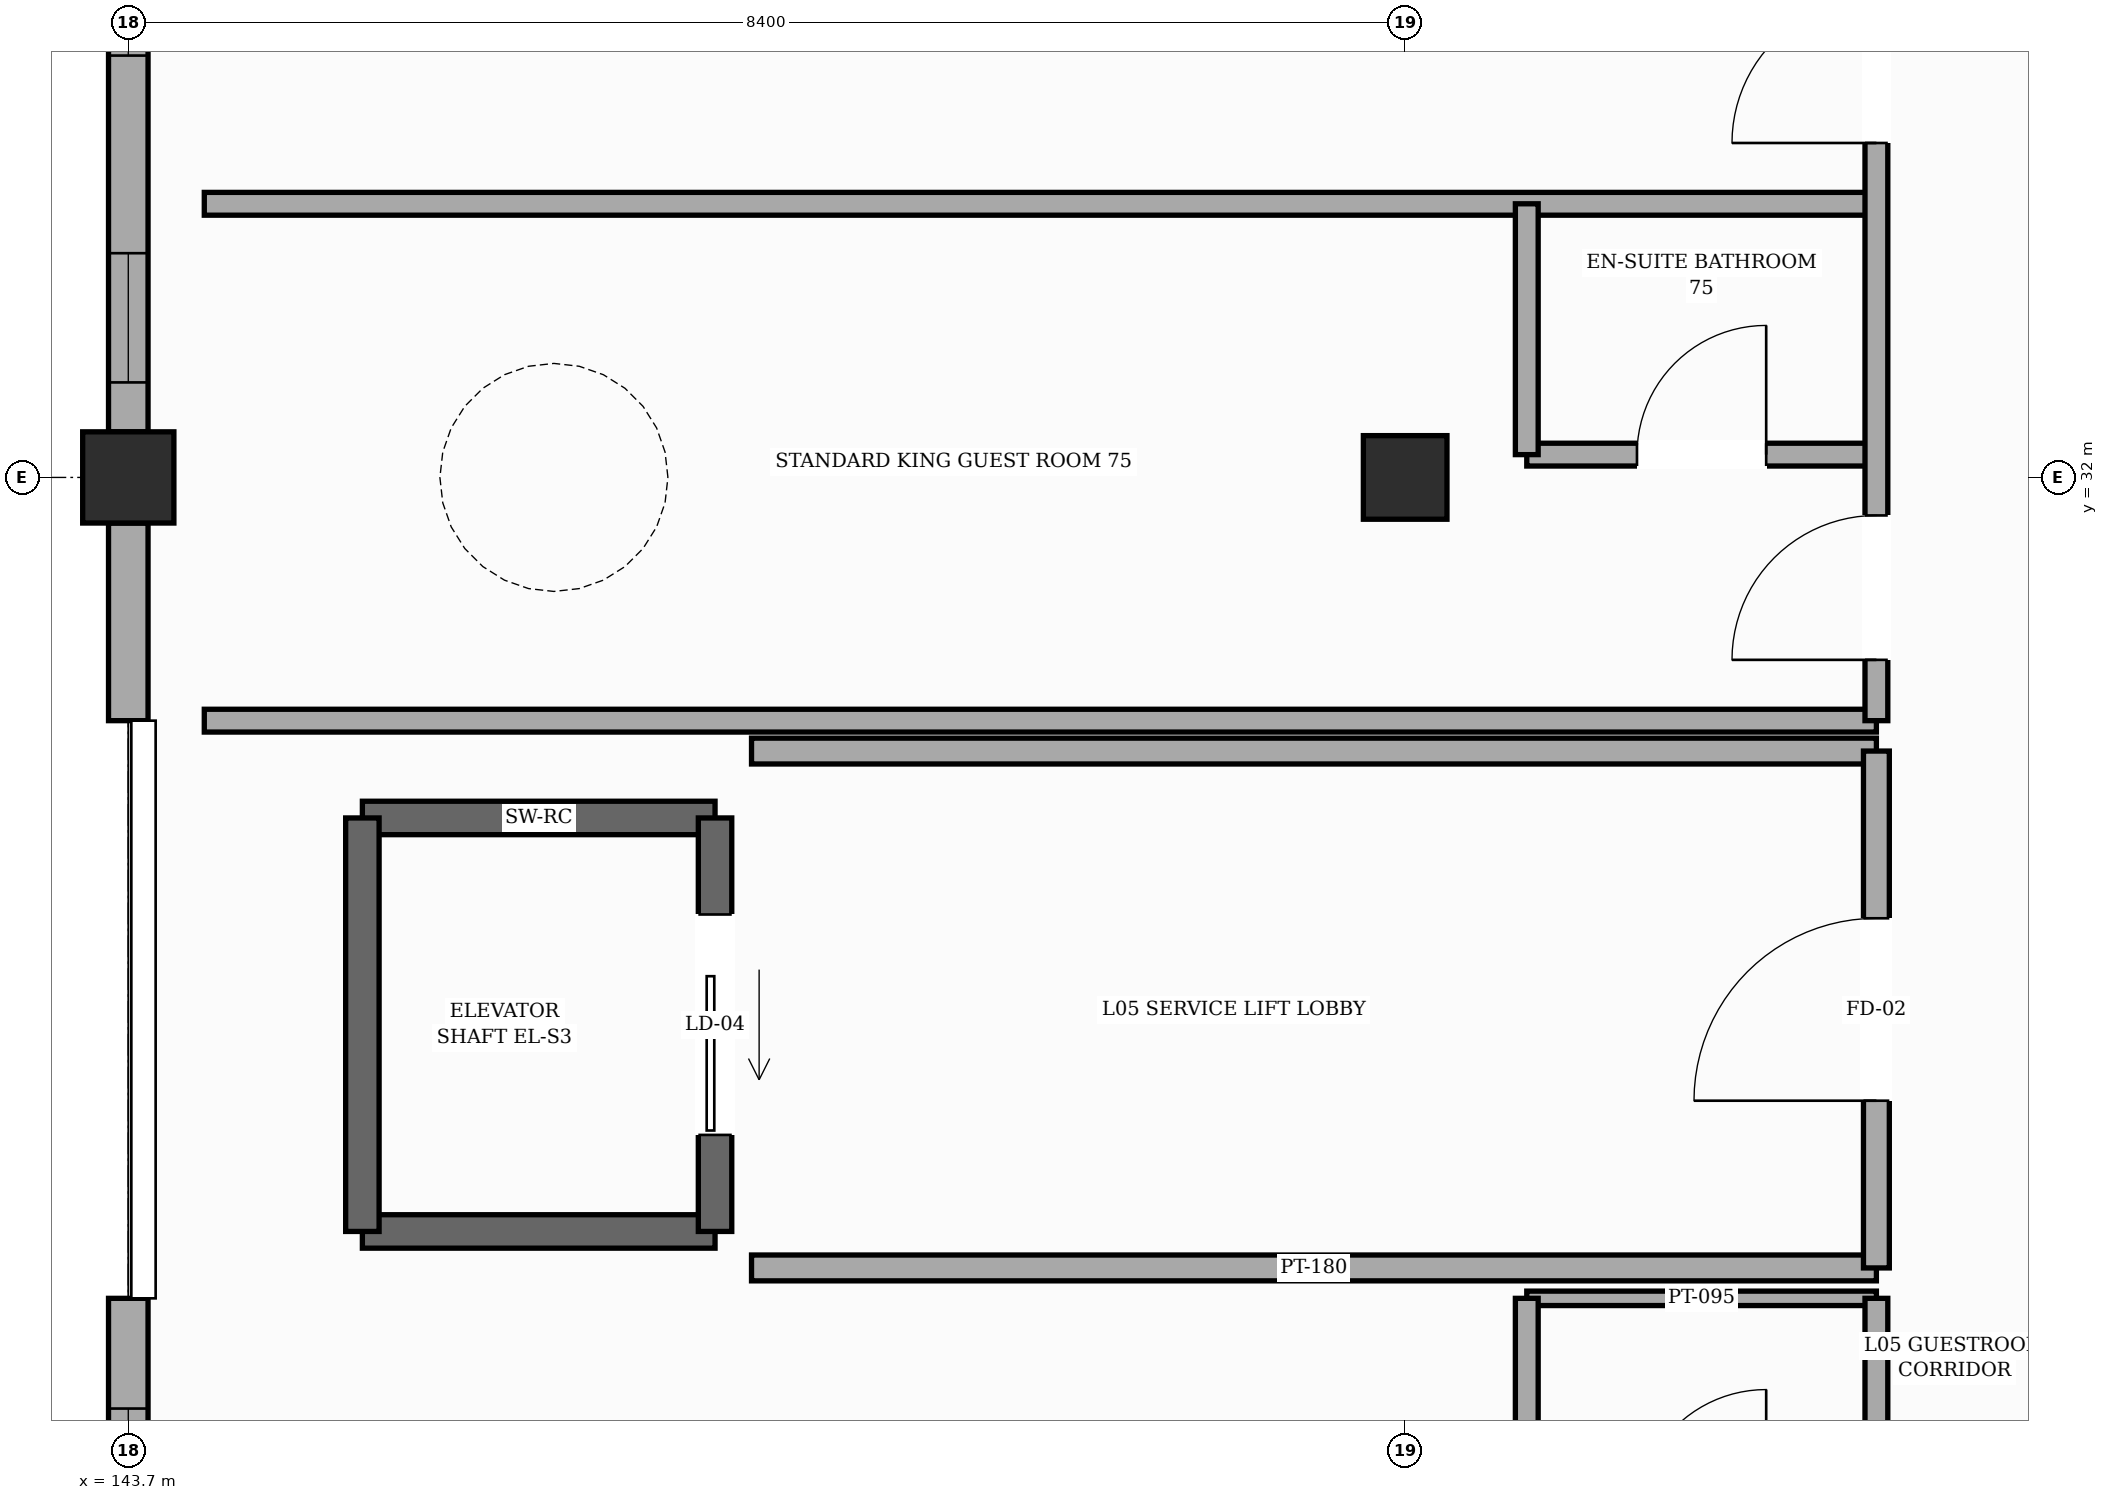
"""IFC4 building model, lengths in metres.
Left out: names, types, materials, properties, quantities, classifications, styles, units other than length and angle.
Written with IfcOpenShell. Run it as: python <this file> out.ifc"""

import sys

from ifc_helpers import new_model, si_unit, direction, frame, frame_2d, origin, origin_2d, place, context, subcontext, project, spatial, rectangle, hollow_rectangle, extrude, element, fill, save


model = new_model("IFC4")
c1 = context("Model", 3, precision=1e-05, world=origin(), true_north=direction((0.0, 1.0)))
c2 = subcontext(c1, "Body", "Model", "MODEL_VIEW")
j1 = project(units=[si_unit("LENGTHUNIT", "METRE"), si_unit("PLANEANGLEUNIT", "RADIAN")], contexts=[c1])
p1 = place(None, origin())
s1 = spatial("IfcSite", under=j1, at=p1, CompositionType="ELEMENT")
p2 = place(p1, origin())
s2 = spatial("IfcBuilding", under=s1, at=p2, CompositionType="ELEMENT")
p3 = place(p2, frame((0.0, 0.0, 24.6)))
s3 = spatial("IfcBuildingStorey", under=s2, at=p3, CompositionType="ELEMENT", Elevation=24.6)
p4 = place(p3, frame((143.7, 32.0, 0.0), z_axis=(0.0, 0.0, 1.0), x_axis=(1.0, 0.0, 0.0)))
e1 = element("IfcColumn", 1, at=p4, inside=s3, PredefinedType="COLUMN", context=c2, shape_type="SweptSolid", body=[
    extrude(hollow_rectangle(XDim=0.6, YDim=0.6, WallThickness=0.025, InnerFilletRadius=0.025, OuterFilletRadius=0.05, at=origin_2d()), origin(), (0.0, 0.0, 1.0), 3.6),
])
p5 = place(p3, frame((152.1, 32.0, 0.0), z_axis=(0.0, 0.0, 1.0), x_axis=(1.0, 0.0, 0.0)))
e2 = element("IfcColumn", 2, at=p5, inside=s3, PredefinedType="COLUMN", context=c2, shape_type="SweptSolid", body=[
    extrude(hollow_rectangle(XDim=0.55, YDim=0.55, WallThickness=0.022, InnerFilletRadius=0.022, OuterFilletRadius=0.044, at=origin_2d()), origin(), (0.0, 0.0, 1.0), 3.6),
])
p6 = place(p3, frame((143.7, 24.3, 0.0), z_axis=(0.0, 0.0, 1.0), x_axis=(0.0, 1.0, 0.0)))
e3 = element("IfcWall", 3, at=p6, inside=s3, PredefinedType="SOLIDWALL", context=c2, shape_type="SweptSolid", body=[
    extrude(rectangle(XDim=2.3, YDim=0.26, at=frame_2d((1.15, 0.0))), origin(), (0.0, 0.0, 1.0), 2.805),
])
p7 = place(p6, frame((0.725, 0.0, 0.85)))
e4 = element("IfcOpeningElement", 4, at=p7, cuts=e3, PredefinedType="OPENING", context=c2, shape_type="SweptSolid", body=[
    extrude(rectangle(XDim=0.85, YDim=1.35, at=frame_2d((0.425, 0.675))), frame((0.0, 0.14, 0.0), z_axis=(0.0, -1.0, 0.0), x_axis=(1.0, 0.0, 0.0)), (0.0, 0.0, 1.0), 0.28),
])
p8 = place(p3, frame((143.7, 30.4, 0.0), z_axis=(0.0, 0.0, 1.0), x_axis=(0.0, 1.0, 0.0)))
e5 = element("IfcWall", 5, at=p8, inside=s3, PredefinedType="SOLIDWALL", context=c2, shape_type="SweptSolid", body=[
    extrude(rectangle(XDim=1.3, YDim=0.26, at=frame_2d((0.65, 0.0))), origin(), (0.0, 0.0, 1.0), 2.805),
])
p9 = place(p3, frame((143.7, 32.3, 0.0), z_axis=(0.0, 0.0, 1.0), x_axis=(0.0, 1.0, 0.0)))
e6 = element("IfcWall", 6, at=p9, inside=s3, PredefinedType="SOLIDWALL", context=c2, shape_type="SweptSolid", body=[
    extrude(rectangle(XDim=8.3, YDim=0.26, at=frame_2d((4.15, 0.0))), origin(), (0.0, 0.0, 1.0), 2.655),
])
p10 = place(p9, frame((0.325, 0.0, 0.85)))
e7 = element("IfcOpeningElement", 7, at=p10, cuts=e6, PredefinedType="OPENING", context=c2, shape_type="SweptSolid", body=[
    extrude(rectangle(XDim=0.85, YDim=1.35, at=frame_2d((0.425, 0.675))), frame((0.0, 0.14, 0.0), z_axis=(0.0, -1.0, 0.0), x_axis=(1.0, 0.0, 0.0)), (0.0, 0.0, 1.0), 0.28),
])
p11 = place(p9, frame((2.475, 0.0, 0.85)))
e8 = element("IfcOpeningElement", 8, at=p11, cuts=e6, PredefinedType="OPENING", context=c2, shape_type="SweptSolid", body=[
    extrude(rectangle(XDim=1.45, YDim=1.35, at=frame_2d((0.725, 0.675))), frame((0.0, 0.14, 0.0), z_axis=(0.0, -1.0, 0.0), x_axis=(1.0, 0.0, 0.0)), (0.0, 0.0, 1.0), 0.28),
])
p12 = place(p9, frame((5.775, 0.0, 0.85)))
e9 = element("IfcOpeningElement", 9, at=p12, cuts=e6, PredefinedType="OPENING", context=c2, shape_type="SweptSolid", body=[
    extrude(rectangle(XDim=1.65, YDim=1.35, at=frame_2d((0.825, 0.675))), frame((0.0, 0.14, 0.0), z_axis=(0.0, -1.0, 0.0), x_axis=(1.0, 0.0, 0.0)), (0.0, 0.0, 1.0), 0.28),
])
for number, where, z_axis, x_axis in (
    (10, (145.24, 29.76, 0.0), (0.0, 0.0, 1.0), (1.0, 0.0, 0.0)),
    (11, (145.24, 27.04, 0.0), (0.0, 0.0, 1.0), (1.0, 0.0, 0.0)),
):
    element("IfcWall", number, at=place(p3, frame(where, z_axis=z_axis, x_axis=x_axis)), inside=s3, PredefinedType="SHEAR", context=c2, shape_type="SweptSolid", body=[
        extrude(rectangle(XDim=2.32, YDim=0.22, at=frame_2d((1.16, 0.0))), origin(), (0.0, 0.0, 1.0), 3.38),
    ])
p13 = place(p3, frame((147.56, 27.04, 0.0), z_axis=(0.0, 0.0, 1.0), x_axis=(0.0, 1.0, 0.0)))
e12 = element("IfcWall", 12, at=p13, inside=s3, PredefinedType="SHEAR", context=c2, shape_type="SweptSolid", body=[
    extrude(rectangle(XDim=2.72, YDim=0.22, at=frame_2d((1.36, 0.0))), origin(), (0.0, 0.0, 1.0), 3.38),
])
p14 = place(p13, frame((0.635, 0.0, 0.0)))
e13 = element("IfcOpeningElement", 13, at=p14, cuts=e12, PredefinedType="OPENING", context=c2, shape_type="SweptSolid", body=[
    extrude(rectangle(XDim=1.45, YDim=2.35, at=frame_2d((0.725, 1.175))), frame((0.0, 0.12, 0.0), z_axis=(0.0, -1.0, 0.0), x_axis=(1.0, 0.0, 0.0)), (0.0, 0.0, 1.0), 0.24),
])
p15 = place(p3, frame((145.24, 27.04, 0.0), z_axis=(0.0, 0.0, 1.0), x_axis=(0.0, 1.0, 0.0)))
e14 = element("IfcWall", 14, at=p15, inside=s3, PredefinedType="SHEAR", context=c2, shape_type="SweptSolid", body=[
    extrude(rectangle(XDim=2.72, YDim=0.22, at=frame_2d((1.36, 0.0))), origin(), (0.0, 0.0, 1.0), 3.38),
])
p16 = place(p3, frame((152.9, 26.6, 0.0), z_axis=(0.0, 0.0, 1.0), x_axis=(1.0, 0.0, 0.0)))
e15 = element("IfcWall", 15, at=p16, inside=s3, PredefinedType="PARTITIONING", context=c2, shape_type="SweptSolid", body=[
    extrude(rectangle(XDim=2.3, YDim=0.095, at=frame_2d((1.15, 0.0))), origin(), (0.0, 0.0, 1.0), 3.365),
])
for number, where, z_axis, x_axis in (
    (16, (147.8, 26.8, 0.0), (0.0, 0.0, 1.0), (1.0, 0.0, 0.0)),
    (17, (147.8, 30.2, 0.0), (0.0, 0.0, 1.0), (1.0, 0.0, 0.0)),
):
    element("IfcWall", number, at=place(p3, frame(where, z_axis=z_axis, x_axis=x_axis)), inside=s3, PredefinedType="PARTITIONING", context=c2, shape_type="SweptSolid", body=[
        extrude(rectangle(XDim=7.4, YDim=0.17, at=frame_2d((3.7, 0.0))), origin(), (0.0, 0.0, 1.0), 3.365),
    ])
p17 = place(p3, frame((144.2, 30.4, 0.0), z_axis=(0.0, 0.0, 1.0), x_axis=(1.0, 0.0, 0.0)))
e18 = element("IfcWall", 18, at=p17, inside=s3, PredefinedType="PARTITIONING", context=c2, shape_type="SweptSolid", body=[
    extrude(rectangle(XDim=11.0, YDim=0.15, at=frame_2d((5.5, 0.0))), origin(), (0.0, 0.0, 1.0), 3.365),
])
p18 = place(p3, frame((152.9, 32.15, 0.0), z_axis=(0.0, 0.0, 1.0), x_axis=(1.0, 0.0, 0.0)))
e19 = element("IfcWall", 19, at=p18, inside=s3, PredefinedType="PARTITIONING", context=c2, shape_type="SweptSolid", body=[
    extrude(rectangle(XDim=2.3, YDim=0.15, at=frame_2d((1.15, 0.0))), origin(), (0.0, 0.0, 1.0), 2.805),
])
p19 = place(p18, frame((0.725, 0.0, 0.0)))
e20 = element("IfcOpeningElement", 20, at=p19, cuts=e19, PredefinedType="OPENING", context=c2, shape_type="SweptSolid", body=[
    extrude(rectangle(XDim=0.85, YDim=2.1, at=frame_2d((0.425, 1.05))), frame((0.0, 0.085, 0.0), z_axis=(0.0, -1.0, 0.0), x_axis=(1.0, 0.0, 0.0)), (0.0, 0.0, 1.0), 0.17),
])
p20 = place(p3, frame((144.2, 33.8, 0.0), z_axis=(0.0, 0.0, 1.0), x_axis=(1.0, 0.0, 0.0)))
e21 = element("IfcWall", 21, at=p20, inside=s3, PredefinedType="PARTITIONING", context=c2, shape_type="SweptSolid", body=[
    extrude(rectangle(XDim=11.0, YDim=0.15, at=frame_2d((5.5, 0.0))), origin(), (0.0, 0.0, 1.0), 3.365),
])
p21 = place(p3, frame((152.9, 25.15, 0.0), z_axis=(0.0, 0.0, 1.0), x_axis=(0.0, 1.0, 0.0)))
e22 = element("IfcWall", 22, at=p21, inside=s3, PredefinedType="PARTITIONING", context=c2, shape_type="SweptSolid", body=[
    extrude(rectangle(XDim=1.45, YDim=0.15, at=frame_2d((0.725, 0.0))), origin(), (0.0, 0.0, 1.0), 3.365),
])
p22 = place(p3, frame((152.9, 32.15, 0.0), z_axis=(0.0, 0.0, 1.0), x_axis=(0.0, 1.0, 0.0)))
e23 = element("IfcWall", 23, at=p22, inside=s3, PredefinedType="PARTITIONING", context=c2, shape_type="SweptSolid", body=[
    extrude(rectangle(XDim=1.65, YDim=0.15, at=frame_2d((0.825, 0.0))), origin(), (0.0, 0.0, 1.0), 3.365),
])
p23 = place(p3, frame((155.2, 1.0, 0.0), z_axis=(0.0, 0.0, 1.0), x_axis=(0.0, 1.0, 0.0)))
e24 = element("IfcWall", 24, at=p23, inside=s3, PredefinedType="PARTITIONING", context=c2, shape_type="SweptSolid", body=[
    extrude(rectangle(XDim=25.6, YDim=0.15, at=frame_2d((12.8, 0.0))), origin(), (0.0, 0.0, 1.0), 3.365),
])
p24 = place(p23, frame((0.325, 0.0, 0.0)))
e25 = element("IfcOpeningElement", 25, at=p24, cuts=e24, PredefinedType="OPENING", context=c2, shape_type="SweptSolid", body=[
    extrude(rectangle(XDim=1.1, YDim=2.2, at=frame_2d((0.55, 1.1))), frame((0.0, 0.085, 0.0), z_axis=(0.0, -1.0, 0.0), x_axis=(1.0, 0.0, 0.0)), (0.0, 0.0, 1.0), 0.17),
])
p25 = place(p23, frame((3.6, 0.0, 0.0)))
e26 = element("IfcOpeningElement", 26, at=p25, cuts=e24, PredefinedType="OPENING", context=c2, shape_type="SweptSolid", body=[
    extrude(rectangle(XDim=0.95, YDim=2.15, at=frame_2d((0.475, 1.075))), frame((0.0, 0.085, 0.0), z_axis=(0.0, -1.0, 0.0), x_axis=(1.0, 0.0, 0.0)), (0.0, 0.0, 1.0), 0.17),
])
p26 = place(p23, frame((6.8, 0.0, 0.0)))
e27 = element("IfcOpeningElement", 27, at=p26, cuts=e24, PredefinedType="OPENING", context=c2, shape_type="SweptSolid", body=[
    extrude(rectangle(XDim=0.95, YDim=2.15, at=frame_2d((0.475, 1.075))), frame((0.0, 0.085, 0.0), z_axis=(0.0, -1.0, 0.0), x_axis=(1.0, 0.0, 0.0)), (0.0, 0.0, 1.0), 0.17),
])
p27 = place(p23, frame((10.0, 0.0, 0.0)))
e28 = element("IfcOpeningElement", 28, at=p27, cuts=e24, PredefinedType="OPENING", context=c2, shape_type="SweptSolid", body=[
    extrude(rectangle(XDim=0.95, YDim=2.15, at=frame_2d((0.475, 1.075))), frame((0.0, 0.085, 0.0), z_axis=(0.0, -1.0, 0.0), x_axis=(1.0, 0.0, 0.0)), (0.0, 0.0, 1.0), 0.17),
])
p28 = place(p23, frame((13.2, 0.0, 0.0)))
e29 = element("IfcOpeningElement", 29, at=p28, cuts=e24, PredefinedType="OPENING", context=c2, shape_type="SweptSolid", body=[
    extrude(rectangle(XDim=0.95, YDim=2.15, at=frame_2d((0.475, 1.075))), frame((0.0, 0.085, 0.0), z_axis=(0.0, -1.0, 0.0), x_axis=(1.0, 0.0, 0.0)), (0.0, 0.0, 1.0), 0.17),
])
p29 = place(p23, frame((16.4, 0.0, 0.0)))
e30 = element("IfcOpeningElement", 30, at=p29, cuts=e24, PredefinedType="OPENING", context=c2, shape_type="SweptSolid", body=[
    extrude(rectangle(XDim=0.95, YDim=2.15, at=frame_2d((0.475, 1.075))), frame((0.0, 0.085, 0.0), z_axis=(0.0, -1.0, 0.0), x_axis=(1.0, 0.0, 0.0)), (0.0, 0.0, 1.0), 0.17),
])
p30 = place(p23, frame((19.6, 0.0, 0.0)))
e31 = element("IfcOpeningElement", 31, at=p30, cuts=e24, PredefinedType="OPENING", context=c2, shape_type="SweptSolid", body=[
    extrude(rectangle(XDim=0.95, YDim=2.15, at=frame_2d((0.475, 1.075))), frame((0.0, 0.085, 0.0), z_axis=(0.0, -1.0, 0.0), x_axis=(1.0, 0.0, 0.0)), (0.0, 0.0, 1.0), 0.17),
])
p31 = place(p23, frame((22.8, 0.0, 0.0)))
e32 = element("IfcOpeningElement", 32, at=p31, cuts=e24, PredefinedType="OPENING", context=c2, shape_type="SweptSolid", body=[
    extrude(rectangle(XDim=0.95, YDim=2.15, at=frame_2d((0.475, 1.075))), frame((0.0, 0.085, 0.0), z_axis=(0.0, -1.0, 0.0), x_axis=(1.0, 0.0, 0.0)), (0.0, 0.0, 1.0), 0.17),
])
p32 = place(p3, frame((155.2, 26.8, 0.0), z_axis=(0.0, 0.0, 1.0), x_axis=(0.0, 1.0, 0.0)))
e33 = element("IfcWall", 33, at=p32, inside=s3, PredefinedType="PARTITIONING", context=c2, shape_type="SweptSolid", body=[
    extrude(rectangle(XDim=3.4, YDim=0.17, at=frame_2d((1.7, 0.0))), origin(), (0.0, 0.0, 1.0), 3.365),
])
p33 = place(p32, frame((1.1, 0.0, 0.0)))
e34 = element("IfcOpeningElement", 34, at=p33, cuts=e33, PredefinedType="OPENING", context=c2, shape_type="SweptSolid", body=[
    extrude(rectangle(XDim=1.2, YDim=2.2, at=frame_2d((0.6, 1.1))), frame((0.0, 0.095, 0.0), z_axis=(0.0, -1.0, 0.0), x_axis=(1.0, 0.0, 0.0)), (0.0, 0.0, 1.0), 0.19),
])
p34 = place(p3, frame((155.2, 30.4, 0.0), z_axis=(0.0, 0.0, 1.0), x_axis=(0.0, 1.0, 0.0)))
e35 = element("IfcWall", 35, at=p34, inside=s3, PredefinedType="PARTITIONING", context=c2, shape_type="SweptSolid", body=[
    extrude(rectangle(XDim=10.2, YDim=0.15, at=frame_2d((5.1, 0.0))), origin(), (0.0, 0.0, 1.0), 3.365),
])
p35 = place(p34, frame((0.4, 0.0, 0.0)))
e36 = element("IfcOpeningElement", 36, at=p35, cuts=e35, PredefinedType="OPENING", context=c2, shape_type="SweptSolid", body=[
    extrude(rectangle(XDim=0.95, YDim=2.15, at=frame_2d((0.475, 1.075))), frame((0.0, 0.085, 0.0), z_axis=(0.0, -1.0, 0.0), x_axis=(1.0, 0.0, 0.0)), (0.0, 0.0, 1.0), 0.17),
])
p36 = place(p34, frame((3.8, 0.0, 0.0)))
e37 = element("IfcOpeningElement", 37, at=p36, cuts=e35, PredefinedType="OPENING", context=c2, shape_type="SweptSolid", body=[
    extrude(rectangle(XDim=0.95, YDim=2.15, at=frame_2d((0.475, 1.075))), frame((0.0, 0.085, 0.0), z_axis=(0.0, -1.0, 0.0), x_axis=(1.0, 0.0, 0.0)), (0.0, 0.0, 1.0), 0.17),
])
p37 = place(p34, frame((7.2, 0.0, 0.0)))
e38 = element("IfcOpeningElement", 38, at=p37, cuts=e35, PredefinedType="OPENING", context=c2, shape_type="SweptSolid", body=[
    extrude(rectangle(XDim=0.95, YDim=2.15, at=frame_2d((0.475, 1.075))), frame((0.0, 0.085, 0.0), z_axis=(0.0, -1.0, 0.0), x_axis=(1.0, 0.0, 0.0)), (0.0, 0.0, 1.0), 0.17),
])
p38 = place(p7, origin())
e39 = element("IfcWindow", 39, at=p38, inside=s3, PartitioningType="SINGLE_PANEL", PredefinedType="WINDOW", context=c2, shape_type="SweptSolid", body=[
    extrude(rectangle(XDim=0.85, YDim=1.35, at=frame_2d((0.425, 0.675))), frame((0.0, 0.03, 0.0), z_axis=(0.0, -1.0, 0.0), x_axis=(1.0, 0.0, 0.0)), (0.0, 0.0, 1.0), 0.06),
])
fill(e4, e39)
p39 = place(p10, origin())
e40 = element("IfcWindow", 40, at=p39, inside=s3, PartitioningType="SINGLE_PANEL", PredefinedType="WINDOW", context=c2, shape_type="SweptSolid", body=[
    extrude(rectangle(XDim=0.85, YDim=1.35, at=frame_2d((0.425, 0.675))), frame((0.0, 0.03, 0.0), z_axis=(0.0, -1.0, 0.0), x_axis=(1.0, 0.0, 0.0)), (0.0, 0.0, 1.0), 0.06),
])
fill(e7, e40)
p40 = place(p11, origin())
e41 = element("IfcWindow", 41, at=p40, inside=s3, PartitioningType="SINGLE_PANEL", PredefinedType="WINDOW", context=c2, shape_type="SweptSolid", body=[
    extrude(rectangle(XDim=1.45, YDim=1.35, at=frame_2d((0.725, 0.675))), frame((0.0, 0.03, 0.0), z_axis=(0.0, -1.0, 0.0), x_axis=(1.0, 0.0, 0.0)), (0.0, 0.0, 1.0), 0.06),
])
fill(e8, e41)
p41 = place(p14, origin())
e42 = element("IfcDoor", 42, at=p41, inside=s3, OperationType="SLIDING_TO_LEFT", PredefinedType="DOOR", context=c2, shape_type="SweptSolid", body=[
    extrude(rectangle(XDim=1.45, YDim=2.35, at=frame_2d((0.725, 1.175))), frame((0.0, 0.025, 0.0), z_axis=(0.0, -1.0, 0.0), x_axis=(1.0, 0.0, 0.0)), (0.0, 0.0, 1.0), 0.05),
])
fill(e13, e42)
p42 = place(p33, origin())
e43 = element("IfcDoor", 43, at=p42, inside=s3, OperationType="SINGLE_SWING_LEFT", PredefinedType="DOOR", context=c2, shape_type="SweptSolid", body=[
    extrude(rectangle(XDim=1.2, YDim=2.2, at=frame_2d((0.6, 1.1))), frame((0.0, 0.025, 0.0), z_axis=(0.0, -1.0, 0.0), x_axis=(1.0, 0.0, 0.0)), (0.0, 0.0, 1.0), 0.05),
])
fill(e34, e43)
p43 = place(p35, origin())
e44 = element("IfcDoor", 44, at=p43, inside=s3, OperationType="SINGLE_SWING_LEFT", PredefinedType="DOOR", context=c2, shape_type="SweptSolid", body=[
    extrude(rectangle(XDim=0.95, YDim=2.15, at=frame_2d((0.475, 1.075))), frame((0.0, 0.025, 0.0), z_axis=(0.0, -1.0, 0.0), x_axis=(1.0, 0.0, 0.0)), (0.0, 0.0, 1.0), 0.05),
])
fill(e36, e44)
p44 = place(p19, origin())
e45 = element("IfcDoor", 45, at=p44, inside=s3, OperationType="SINGLE_SWING_RIGHT", PredefinedType="DOOR", context=c2, shape_type="SweptSolid", body=[
    extrude(rectangle(XDim=0.85, YDim=2.1, at=frame_2d((0.425, 1.05))), frame((0.0, 0.025, 0.0), z_axis=(0.0, -1.0, 0.0), x_axis=(1.0, 0.0, 0.0)), (0.0, 0.0, 1.0), 0.05),
])
fill(e20, e45)
p45 = place(p36, origin())
e46 = element("IfcDoor", 46, at=p45, inside=s3, OperationType="SINGLE_SWING_LEFT", PredefinedType="DOOR", context=c2, shape_type="SweptSolid", body=[
    extrude(rectangle(XDim=0.95, YDim=2.15, at=frame_2d((0.475, 1.075))), frame((0.0, 0.025, 0.0), z_axis=(0.0, -1.0, 0.0), x_axis=(1.0, 0.0, 0.0)), (0.0, 0.0, 1.0), 0.05),
])
fill(e37, e46)
save(model, sys.argv[1])
